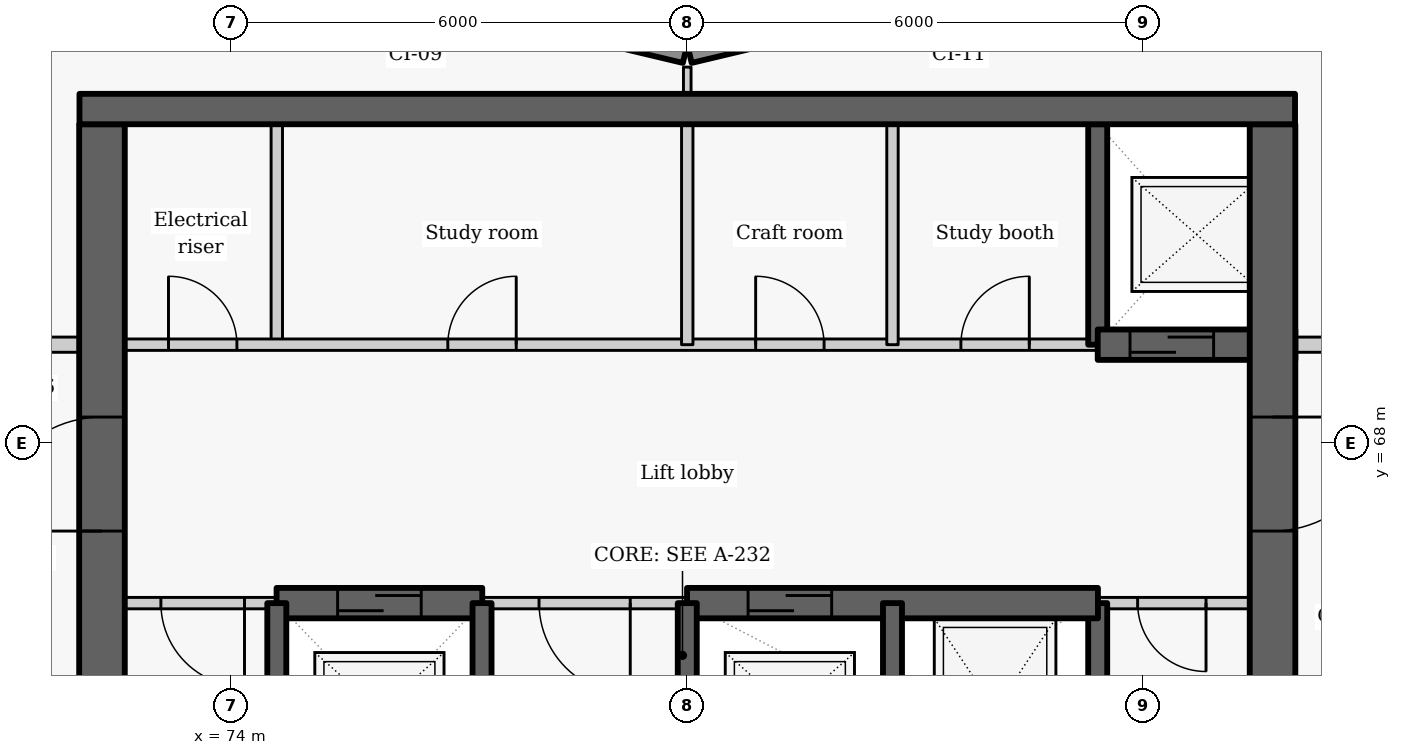
"""IFC4 building model, lengths in metres.
Left out: names, types, materials, properties, quantities, classifications, styles, units other than length and angle.
Written with IfcOpenShell. Run it as: python <this file> out.ifc"""

import sys

from ifc_helpers import new_model, si_unit, direction, frame, frame_2d, origin, place, context, subcontext, project, spatial, rectangle, extrude, element, fill, save


model = new_model("IFC4")
c1 = context("Model", 3, precision=1e-05, world=origin(), true_north=direction((0.0, 1.0)))
c2 = subcontext(c1, "Body", "Model", "MODEL_VIEW")
j1 = project(units=[si_unit("LENGTHUNIT", "METRE"), si_unit("PLANEANGLEUNIT", "RADIAN")], contexts=[c1])
p1 = place(None, origin())
s1 = spatial("IfcSite", under=j1, at=p1, CompositionType="ELEMENT")
p2 = place(p1, origin())
s2 = spatial("IfcBuilding", under=s1, at=p2, CompositionType="ELEMENT")
p3 = place(p2, frame((0.0, 0.0, 180.0)))
s3 = spatial("IfcBuildingStorey", under=s2, at=p3, CompositionType="ELEMENT", Elevation=180.0)
p4 = place(p3, frame((83.186, 73.881, 0.0), z_axis=(0.0, 0.0, 1.0), x_axis=(-0.972773113459, -0.231759508395, 0.0)))
e1 = element("IfcWall", 1, at=p4, inside=s3, PredefinedType="SOLIDWALL", context=c2, shape_type="SweptSolid", body=[
    extrude(rectangle(XDim=3.246, YDim=0.25, at=frame_2d((1.623, 0.0))), origin(), (0.0, 0.0, 1.0), 2.425),
])
p5 = place(p4, frame((0.573, 0.0, 0.9)))
e2 = element("IfcOpeningElement", 2, at=p5, cuts=e1, PredefinedType="OPENING", context=c2, shape_type="SweptSolid", body=[
    extrude(rectangle(XDim=2.1, YDim=1.1, at=frame_2d((1.05, 0.55))), frame((0.0, 0.135, 0.0), z_axis=(0.0, -1.0, 0.0), x_axis=(1.0, 0.0, 0.0)), (0.0, 0.0, 1.0), 0.27),
])
p6 = place(p3, frame((79.971, 73.128, 0.0), z_axis=(0.0, 0.0, 1.0), x_axis=(-0.972773113459, 0.231759508395, 0.0)))
e3 = element("IfcWall", 3, at=p6, inside=s3, PredefinedType="SOLIDWALL", context=c2, shape_type="SweptSolid", body=[
    extrude(rectangle(XDim=3.246, YDim=0.25, at=frame_2d((1.623, 0.0))), origin(), (0.0, 0.0, 1.0), 2.425),
])
p7 = place(p6, frame((0.573, 0.0, 0.9)))
e4 = element("IfcOpeningElement", 4, at=p7, cuts=e3, PredefinedType="OPENING", context=c2, shape_type="SweptSolid", body=[
    extrude(rectangle(XDim=2.1, YDim=1.1, at=frame_2d((1.05, 0.55))), frame((0.0, 0.135, 0.0), z_axis=(0.0, -1.0, 0.0), x_axis=(1.0, 0.0, 0.0)), (0.0, 0.0, 1.0), 0.27),
])
p8 = place(p3, frame((74.6, 69.3, 0.0), z_axis=(0.0, 0.0, 1.0), x_axis=(0.0, 1.0, 0.0)))
e5 = element("IfcWall", 5, at=p8, inside=s3, PredefinedType="PARTITIONING", context=c2, shape_type="SweptSolid", body=[
    extrude(rectangle(XDim=2.9, YDim=0.15, at=frame_2d((1.45, 0.0))), origin(), (0.0, 0.0, 1.0), 3.025),
])
p9 = place(p3, frame((72.0, 69.3, 0.0), z_axis=(0.0, 0.0, 1.0), x_axis=(1.0, 0.0, 0.0)))
e6 = element("IfcWall", 6, at=p9, inside=s3, PredefinedType="PARTITIONING", context=c2, shape_type="SweptSolid", body=[
    extrude(rectangle(XDim=13.4, YDim=0.15, at=frame_2d((6.7, 0.0))), origin(), (0.0, 0.0, 1.0), 3.025),
])
p10 = place(p9, frame((1.175, 0.0, 0.0)))
e7 = element("IfcOpeningElement", 7, at=p10, cuts=e6, PredefinedType="OPENING", context=c2, shape_type="SweptSolid", body=[
    extrude(rectangle(XDim=0.9, YDim=2.1, at=frame_2d((0.45, 1.05))), frame((0.0, 0.085, 0.0), z_axis=(0.0, -1.0, 0.0), x_axis=(1.0, 0.0, 0.0)), (0.0, 0.0, 1.0), 0.17),
])
p11 = place(p9, frame((4.85, 0.0, 0.0)))
e8 = element("IfcOpeningElement", 8, at=p11, cuts=e6, PredefinedType="OPENING", context=c2, shape_type="SweptSolid", body=[
    extrude(rectangle(XDim=0.9, YDim=2.1, at=frame_2d((0.45, 1.05))), frame((0.0, 0.085, 0.0), z_axis=(0.0, -1.0, 0.0), x_axis=(1.0, 0.0, 0.0)), (0.0, 0.0, 1.0), 0.17),
])
p12 = place(p9, frame((8.9, 0.0, 0.0)))
e9 = element("IfcOpeningElement", 9, at=p12, cuts=e6, PredefinedType="OPENING", context=c2, shape_type="SweptSolid", body=[
    extrude(rectangle(XDim=0.9, YDim=2.1, at=frame_2d((0.45, 1.05))), frame((0.0, 0.085, 0.0), z_axis=(0.0, -1.0, 0.0), x_axis=(1.0, 0.0, 0.0)), (0.0, 0.0, 1.0), 0.17),
])
p13 = place(p9, frame((11.6, 0.0, 0.0)))
e10 = element("IfcOpeningElement", 10, at=p13, cuts=e6, PredefinedType="OPENING", context=c2, shape_type="SweptSolid", body=[
    extrude(rectangle(XDim=0.9, YDim=2.1, at=frame_2d((0.45, 1.05))), frame((0.0, 0.085, 0.0), z_axis=(0.0, -1.0, 0.0), x_axis=(1.0, 0.0, 0.0)), (0.0, 0.0, 1.0), 0.17),
])
p14 = place(p3, frame((72.3, 63.1, -0.275), z_axis=(0.0, 0.0, 1.0), x_axis=(0.0, 1.0, 0.0)))
e11 = element("IfcWall", 11, at=p14, inside=s3, PredefinedType="SHEAR", context=c2, shape_type="SweptSolid", body=[
    extrude(rectangle(XDim=9.1, YDim=0.6, at=frame_2d((4.55, 0.0))), origin(), (0.0, 0.0, 1.0), 3.3),
])
p15 = place(p14, frame((3.748, 0.0, 0.275)))
e12 = element("IfcOpeningElement", 12, at=p15, cuts=e11, PredefinedType="OPENING", context=c2, shape_type="SweptSolid", body=[
    extrude(rectangle(XDim=1.5, YDim=2.1, at=frame_2d((0.75, 1.05))), frame((0.0, 0.31, 0.0), z_axis=(0.0, -1.0, 0.0), x_axis=(1.0, 0.0, 0.0)), (0.0, 0.0, 1.0), 0.62),
])
p16 = place(p3, frame((85.4, 63.1, -0.275), z_axis=(0.0, 0.0, 1.0), x_axis=(0.0, 1.0, 0.0)))
e13 = element("IfcWall", 13, at=p16, inside=s3, PredefinedType="SHEAR", context=c2, shape_type="SweptSolid", body=[
    extrude(rectangle(XDim=2.8, YDim=0.25, at=frame_2d((1.4, 0.0))), origin(), (0.0, 0.0, 1.0), 3.3),
])
p17 = place(p3, frame((85.4, 69.3, -0.275), z_axis=(0.0, 0.0, 1.0), x_axis=(0.0, 1.0, 0.0)))
e14 = element("IfcWall", 14, at=p17, inside=s3, PredefinedType="SHEAR", context=c2, shape_type="SweptSolid", body=[
    extrude(rectangle(XDim=2.9, YDim=0.25, at=frame_2d((1.45, 0.0))), origin(), (0.0, 0.0, 1.0), 3.3),
])
p18 = place(p3, frame((85.4, 69.3, -0.275), z_axis=(0.0, 0.0, 1.0), x_axis=(1.0, 0.0, 0.0)))
e15 = element("IfcWall", 15, at=p18, inside=s3, PredefinedType="SHEAR", context=c2, shape_type="SweptSolid", body=[
    extrude(rectangle(XDim=2.6, YDim=0.4, at=frame_2d((1.3, 0.0))), origin(), (0.0, 0.0, 1.0), 3.3),
])
p19 = place(p18, frame((0.425, 0.0, 0.275)))
e16 = element("IfcOpeningElement", 16, at=p19, cuts=e15, PredefinedType="OPENING", context=c2, shape_type="SweptSolid", body=[
    extrude(rectangle(XDim=1.1, YDim=2.1, at=frame_2d((0.55, 1.05))), frame((0.0, 0.21, 0.0), z_axis=(0.0, -1.0, 0.0), x_axis=(1.0, 0.0, 0.0)), (0.0, 0.0, 1.0), 0.42),
])
p20 = place(p3, frame((87.7, 72.2, -0.275), z_axis=(0.0, 0.0, 1.0), x_axis=(0.0, -1.0, 0.0)))
e17 = element("IfcWall", 17, at=p20, inside=s3, PredefinedType="SHEAR", context=c2, shape_type="SweptSolid", body=[
    extrude(rectangle(XDim=14.25, YDim=0.6, at=frame_2d((7.125, 0.0))), origin(), (0.0, 0.0, 1.0), 3.3),
])
p21 = place(p20, frame((3.852, 0.0, 0.275)))
e18 = element("IfcOpeningElement", 18, at=p21, cuts=e17, PredefinedType="OPENING", context=c2, shape_type="SweptSolid", body=[
    extrude(rectangle(XDim=1.5, YDim=2.1, at=frame_2d((0.75, 1.05))), frame((0.0, 0.31, 0.0), z_axis=(0.0, -1.0, 0.0), x_axis=(1.0, 0.0, 0.0)), (0.0, 0.0, 1.0), 0.62),
])
for number, where, z_axis, x_axis in (
    (19, (80.0, 69.3, 0.0), (0.0, 0.0, 1.0), (0.0, 1.0, 0.0)),
    (20, (82.7, 69.3, 0.0), (0.0, 0.0, 1.0), (0.0, 1.0, 0.0)),
):
    element("IfcWall", number, at=place(p3, frame(where, z_axis=z_axis, x_axis=x_axis)), inside=s3, PredefinedType="PARTITIONING", context=c2, shape_type="SweptSolid", body=[
        extrude(rectangle(XDim=2.9, YDim=0.15, at=frame_2d((1.45, 0.0))), origin(), (0.0, 0.0, 1.0), 3.025),
    ])
p22 = place(p3, frame((74.603, 65.9, 0.0), z_axis=(0.0, 0.0, 1.0), x_axis=(-1.0, 0.0, 0.0)))
e21 = element("IfcWall", 21, at=p22, inside=s3, PredefinedType="PARTITIONING", context=c2, shape_type="SweptSolid", body=[
    extrude(rectangle(XDim=2.603, YDim=0.15, at=frame_2d((1.302, 0.0))), origin(), (0.0, 0.0, 1.0), 3.025),
])
p23 = place(p22, frame((0.428, 0.0, 0.0)))
e22 = element("IfcOpeningElement", 22, at=p23, cuts=e21, PredefinedType="OPENING", context=c2, shape_type="SweptSolid", body=[
    extrude(rectangle(XDim=1.1, YDim=2.1, at=frame_2d((0.55, 1.05))), frame((0.0, 0.085, 0.0), z_axis=(0.0, -1.0, 0.0), x_axis=(1.0, 0.0, 0.0)), (0.0, 0.0, 1.0), 0.17),
])
p24 = place(p3, frame((80.003, 65.9, 0.0), z_axis=(0.0, 0.0, 1.0), x_axis=(-1.0, 0.0, 0.0)))
e23 = element("IfcWall", 23, at=p24, inside=s3, PredefinedType="PARTITIONING", context=c2, shape_type="SweptSolid", body=[
    extrude(rectangle(XDim=2.706, YDim=0.15, at=frame_2d((1.353, 0.0))), origin(), (0.0, 0.0, 1.0), 3.025),
])
p25 = place(p24, frame((0.753, 0.0, 0.0)))
e24 = element("IfcOpeningElement", 24, at=p25, cuts=e23, PredefinedType="OPENING", context=c2, shape_type="SweptSolid", body=[
    extrude(rectangle(XDim=1.2, YDim=2.1, at=frame_2d((0.6, 1.05))), frame((0.0, 0.085, 0.0), z_axis=(0.0, -1.0, 0.0), x_axis=(1.0, 0.0, 0.0)), (0.0, 0.0, 1.0), 0.17),
])
p26 = place(p3, frame((88.0, 65.9, 0.0), z_axis=(0.0, 0.0, 1.0), x_axis=(-1.0, 0.0, 0.0)))
e25 = element("IfcWall", 25, at=p26, inside=s3, PredefinedType="PARTITIONING", context=c2, shape_type="SweptSolid", body=[
    extrude(rectangle(XDim=2.603, YDim=0.15, at=frame_2d((1.302, 0.0))), origin(), (0.0, 0.0, 1.0), 3.025),
])
p27 = place(p26, frame((1.175, 0.0, 0.0)))
e26 = element("IfcOpeningElement", 26, at=p27, cuts=e25, PredefinedType="OPENING", context=c2, shape_type="SweptSolid", body=[
    extrude(rectangle(XDim=0.9, YDim=2.1, at=frame_2d((0.45, 1.05))), frame((0.0, 0.085, 0.0), z_axis=(0.0, -1.0, 0.0), x_axis=(1.0, 0.0, 0.0)), (0.0, 0.0, 1.0), 0.17),
])
p28 = place(p3, frame((74.597, 65.9, -0.275), z_axis=(0.0, 0.0, 1.0), x_axis=(1.0, 0.0, 0.0)))
e27 = element("IfcWall", 27, at=p28, inside=s3, PredefinedType="SHEAR", context=c2, shape_type="SweptSolid", body=[
    extrude(rectangle(XDim=2.706, YDim=0.4, at=frame_2d((1.353, 0.0))), origin(), (0.0, 0.0, 1.0), 3.3),
])
p29 = place(p28, frame((0.803, 0.0, 0.275)))
e28 = element("IfcOpeningElement", 28, at=p29, cuts=e27, PredefinedType="OPENING", context=c2, shape_type="SweptSolid", body=[
    extrude(rectangle(XDim=1.1, YDim=2.1, at=frame_2d((0.55, 1.05))), frame((0.0, 0.21, 0.0), z_axis=(0.0, -1.0, 0.0), x_axis=(1.0, 0.0, 0.0)), (0.0, 0.0, 1.0), 0.42),
])
p30 = place(p3, frame((79.997, 65.9, -0.275), z_axis=(0.0, 0.0, 1.0), x_axis=(1.0, 0.0, 0.0)))
e29 = element("IfcWall", 29, at=p30, inside=s3, PredefinedType="SHEAR", context=c2, shape_type="SweptSolid", body=[
    extrude(rectangle(XDim=5.406, YDim=0.4, at=frame_2d((2.703, 0.0))), origin(), (0.0, 0.0, 1.0), 3.3),
])
p31 = place(p30, frame((0.803, 0.0, 0.275)))
e30 = element("IfcOpeningElement", 30, at=p31, cuts=e29, PredefinedType="OPENING", context=c2, shape_type="SweptSolid", body=[
    extrude(rectangle(XDim=1.1, YDim=2.1, at=frame_2d((0.55, 1.05))), frame((0.0, 0.21, 0.0), z_axis=(0.0, -1.0, 0.0), x_axis=(1.0, 0.0, 0.0)), (0.0, 0.0, 1.0), 0.42),
])
for number, where, z_axis, x_axis in (
    (31, (74.6, 63.1, -0.275), (0.0, 0.0, 1.0), (0.0, 1.0, 0.0)),
    (32, (77.3, 63.1, -0.275), (0.0, 0.0, 1.0), (0.0, 1.0, 0.0)),
    (33, (80.0, 63.1, -0.275), (0.0, 0.0, 1.0), (0.0, 1.0, 0.0)),
    (34, (82.7, 63.1, -0.275), (0.0, 0.0, 1.0), (0.0, 1.0, 0.0)),
):
    element("IfcWall", number, at=place(p3, frame(where, z_axis=z_axis, x_axis=x_axis)), inside=s3, PredefinedType="SHEAR", context=c2, shape_type="SweptSolid", body=[
        extrude(rectangle(XDim=2.8, YDim=0.25, at=frame_2d((1.4, 0.0))), origin(), (0.0, 0.0, 1.0), 3.3),
    ])
for number, where, z_axis, x_axis in (
    (35, (70.45, 69.3, 0.0), (0.0, 0.0, 1.0), (1.0, 0.0, 0.0)),
    (36, (88.0, 69.3, 0.0), (0.0, 0.0, 1.0), (1.0, 0.0, 0.0)),
):
    element("IfcWall", number, at=place(p3, frame(where, z_axis=z_axis, x_axis=x_axis)), inside=s3, PredefinedType="PARTITIONING", context=c2, shape_type="SweptSolid", body=[
        extrude(rectangle(XDim=1.55, YDim=0.2, at=frame_2d((0.775, 0.0))), origin(), (0.0, 0.0, 1.0), 3.025),
    ])
p32 = place(p3, frame((80.0, 72.6, 0.0), z_axis=(0.0, 0.0, 1.0), x_axis=(0.0, 1.0, 0.0)))
e37 = element("IfcWall", 37, at=p32, inside=s3, PredefinedType="PARTITIONING", context=c2, shape_type="SweptSolid", body=[
    extrude(rectangle(XDim=0.352, YDim=0.1, at=frame_2d((0.176, 0.0))), origin(), (0.0, 0.0, 1.0), 3.025),
])
p33 = place(p3, frame((72.004, 72.4, -0.275), z_axis=(0.0, 0.0, 1.0), x_axis=(1.0, 0.0, 0.0)))
e38 = element("IfcWall", 38, at=p33, inside=s3, PredefinedType="SHEAR", context=c2, shape_type="SweptSolid", body=[
    extrude(rectangle(XDim=15.992, YDim=0.4, at=frame_2d((7.996, 0.0))), origin(), (0.0, 0.0, 1.0), 3.3),
])
p34 = place(p10, origin())
e39 = element("IfcDoor", 39, at=p34, inside=s3, OperationType="SINGLE_SWING_LEFT", PredefinedType="DOOR", context=c2, shape_type="SweptSolid", body=[
    extrude(rectangle(XDim=0.9, YDim=2.1, at=frame_2d((0.45, 1.05))), frame((0.0, 0.025, 0.0), z_axis=(0.0, -1.0, 0.0), x_axis=(1.0, 0.0, 0.0)), (0.0, 0.0, 1.0), 0.05),
])
fill(e7, e39)
p35 = place(p19, origin())
e40 = element("IfcDoor", 40, at=p35, inside=s3, OperationType="SLIDING_TO_LEFT", PredefinedType="DOOR", context=c2, shape_type="SweptSolid", body=[
    extrude(rectangle(XDim=1.1, YDim=2.1, at=frame_2d((0.55, 1.05))), frame((0.0, 0.025, 0.0), z_axis=(0.0, -1.0, 0.0), x_axis=(1.0, 0.0, 0.0)), (0.0, 0.0, 1.0), 0.05),
])
fill(e16, e40)
p36 = place(p11, origin())
e41 = element("IfcDoor", 41, at=p36, inside=s3, OperationType="SINGLE_SWING_RIGHT", PredefinedType="DOOR", context=c2, shape_type="SweptSolid", body=[
    extrude(rectangle(XDim=0.9, YDim=2.1, at=frame_2d((0.45, 1.05))), frame((0.0, 0.025, 0.0), z_axis=(0.0, -1.0, 0.0), x_axis=(1.0, 0.0, 0.0)), (0.0, 0.0, 1.0), 0.05),
])
fill(e8, e41)
p37 = place(p12, origin())
e42 = element("IfcDoor", 42, at=p37, inside=s3, OperationType="SINGLE_SWING_LEFT", PredefinedType="DOOR", context=c2, shape_type="SweptSolid", body=[
    extrude(rectangle(XDim=0.9, YDim=2.1, at=frame_2d((0.45, 1.05))), frame((0.0, 0.025, 0.0), z_axis=(0.0, -1.0, 0.0), x_axis=(1.0, 0.0, 0.0)), (0.0, 0.0, 1.0), 0.05),
])
fill(e9, e42)
p38 = place(p13, origin())
e43 = element("IfcDoor", 43, at=p38, inside=s3, OperationType="SINGLE_SWING_RIGHT", PredefinedType="DOOR", context=c2, shape_type="SweptSolid", body=[
    extrude(rectangle(XDim=0.9, YDim=2.1, at=frame_2d((0.45, 1.05))), frame((0.0, 0.025, 0.0), z_axis=(0.0, -1.0, 0.0), x_axis=(1.0, 0.0, 0.0)), (0.0, 0.0, 1.0), 0.05),
])
fill(e10, e43)
p39 = place(p23, origin())
e44 = element("IfcDoor", 44, at=p39, inside=s3, OperationType="SINGLE_SWING_LEFT", PredefinedType="DOOR", context=c2, shape_type="SweptSolid", body=[
    extrude(rectangle(XDim=1.1, YDim=2.1, at=frame_2d((0.55, 1.05))), frame((0.0, 0.025, 0.0), z_axis=(0.0, -1.0, 0.0), x_axis=(1.0, 0.0, 0.0)), (0.0, 0.0, 1.0), 0.05),
])
fill(e22, e44)
p40 = place(p29, origin())
e45 = element("IfcDoor", 45, at=p40, inside=s3, OperationType="SLIDING_TO_LEFT", PredefinedType="DOOR", context=c2, shape_type="SweptSolid", body=[
    extrude(rectangle(XDim=1.1, YDim=2.1, at=frame_2d((0.55, 1.05))), frame((0.0, 0.025, 0.0), z_axis=(0.0, -1.0, 0.0), x_axis=(1.0, 0.0, 0.0)), (0.0, 0.0, 1.0), 0.05),
])
fill(e28, e45)
p41 = place(p25, origin())
e46 = element("IfcDoor", 46, at=p41, inside=s3, OperationType="DOUBLE_DOOR_SINGLE_SWING", PredefinedType="DOOR", context=c2, shape_type="SweptSolid", body=[
    extrude(rectangle(XDim=1.2, YDim=2.1, at=frame_2d((0.6, 1.05))), frame((0.0, 0.025, 0.0), z_axis=(0.0, -1.0, 0.0), x_axis=(1.0, 0.0, 0.0)), (0.0, 0.0, 1.0), 0.05),
])
fill(e24, e46)
p42 = place(p31, origin())
e47 = element("IfcDoor", 47, at=p42, inside=s3, OperationType="SLIDING_TO_LEFT", PredefinedType="DOOR", context=c2, shape_type="SweptSolid", body=[
    extrude(rectangle(XDim=1.1, YDim=2.1, at=frame_2d((0.55, 1.05))), frame((0.0, 0.025, 0.0), z_axis=(0.0, -1.0, 0.0), x_axis=(1.0, 0.0, 0.0)), (0.0, 0.0, 1.0), 0.05),
])
fill(e30, e47)
p43 = place(p27, origin())
e48 = element("IfcDoor", 48, at=p43, inside=s3, OperationType="SINGLE_SWING_LEFT", PredefinedType="DOOR", context=c2, shape_type="SweptSolid", body=[
    extrude(rectangle(XDim=0.9, YDim=2.1, at=frame_2d((0.45, 1.05))), frame((0.0, 0.025, 0.0), z_axis=(0.0, -1.0, 0.0), x_axis=(1.0, 0.0, 0.0)), (0.0, 0.0, 1.0), 0.05),
])
fill(e26, e48)
p44 = place(p21, origin())
e49 = element("IfcDoor", 49, at=p44, inside=s3, OperationType="DOUBLE_DOOR_SINGLE_SWING", PredefinedType="DOOR", context=c2, shape_type="SweptSolid", body=[
    extrude(rectangle(XDim=1.5, YDim=2.1, at=frame_2d((0.75, 1.05))), frame((0.0, 0.025, 0.0), z_axis=(0.0, -1.0, 0.0), x_axis=(1.0, 0.0, 0.0)), (0.0, 0.0, 1.0), 0.05),
])
fill(e18, e49)
p45 = place(p15, origin())
e50 = element("IfcDoor", 50, at=p45, inside=s3, OperationType="DOUBLE_DOOR_SINGLE_SWING", PredefinedType="DOOR", context=c2, shape_type="SweptSolid", body=[
    extrude(rectangle(XDim=1.5, YDim=2.1, at=frame_2d((0.75, 1.05))), frame((0.0, 0.025, 0.0), z_axis=(0.0, -1.0, 0.0), x_axis=(1.0, 0.0, 0.0)), (0.0, 0.0, 1.0), 0.05),
])
fill(e12, e50)
save(model, sys.argv[1])
